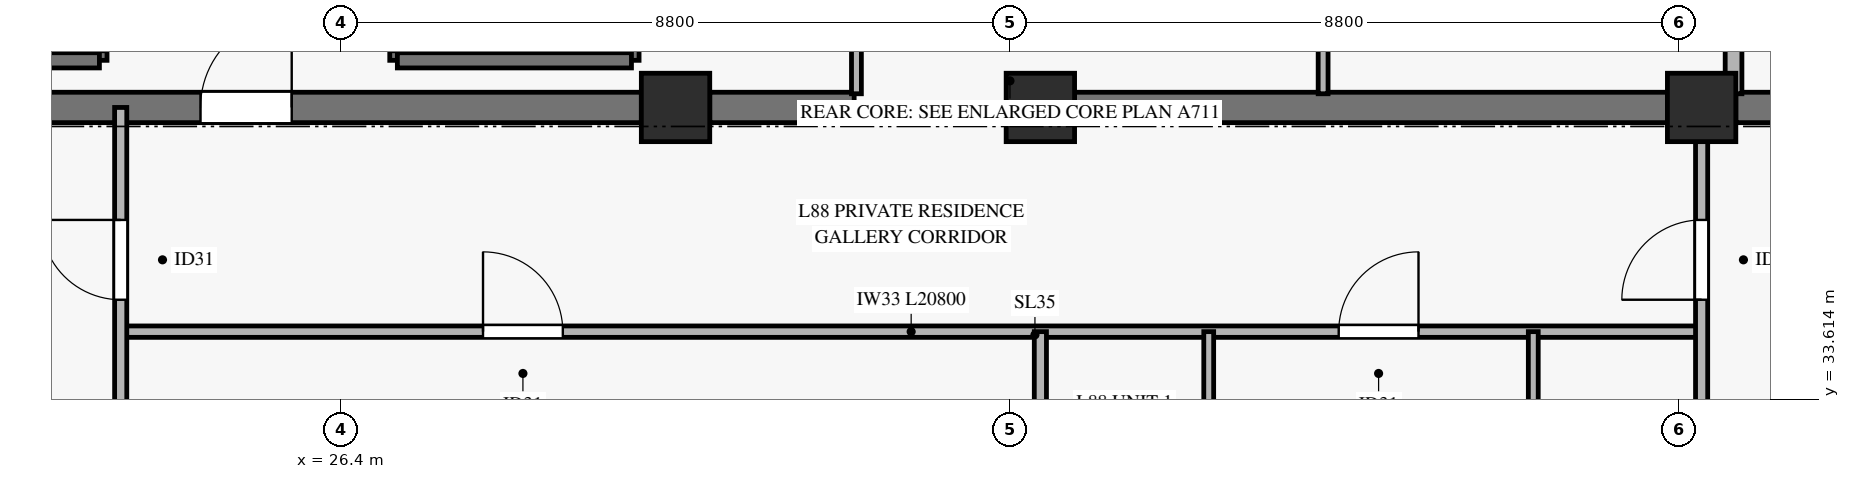
"""IFC4 building model, lengths in metres.
Left out: names, types, materials, properties, quantities, classifications, styles, units other than length and angle.
Written with IfcOpenShell. Run it as: python <this file> out.ifc"""

import sys

from ifc_helpers import new_model, si_unit, direction, frame, frame_2d, origin, origin_2d, place, context, subcontext, project, spatial, rectangle, extrude, source, transform, mapped, element, fill, save


model = new_model("IFC4")
c1 = context("Model", 3, precision=1e-05, world=origin(), true_north=direction((0.0, 1.0)))
c2 = subcontext(c1, "Body", "Model", "MODEL_VIEW")
j1 = project(units=[si_unit("LENGTHUNIT", "METRE"), si_unit("PLANEANGLEUNIT", "RADIAN")], contexts=[c1])
p1 = place(None, origin())
s1 = spatial("IfcSite", under=j1, at=p1, CompositionType="ELEMENT")
p2 = place(p1, origin())
s2 = spatial("IfcBuilding", under=s1, at=p2, CompositionType="ELEMENT")
p3 = place(p2, frame((0.0, 0.0, 339.1)))
s3 = spatial("IfcBuildingStorey", under=s2, at=p3, CompositionType="ELEMENT", Elevation=339.1)
m1 = source(origin(), c2, "Body", "SweptSolid", [
    extrude(rectangle(XDim=0.9, YDim=0.9, at=origin_2d()), origin(), (0.0, 0.0, 1.0), 3.185),
])
for number, where, z_axis, x_axis in (
    (1, (30.8, 37.45, 0.0), (0.0, 0.0, 1.0), (1.0, 0.0, 0.0)),
    (2, (35.6, 37.45, 0.0), (0.0, 0.0, 1.0), (1.0, 0.0, 0.0)),
    (3, (44.3, 37.45, 0.0), (0.0, 0.0, 1.0), (1.0, 0.0, 0.0)),
):
    element("IfcColumn", number, at=place(p3, frame(where, z_axis=z_axis, x_axis=x_axis)), inside=s3, PredefinedType="PILASTER", context=c2, shape_type="MappedRepresentation", body=[
        mapped(m1, transform((0.0, 0.0, 0.0), x_axis=(1.0, 0.0, 0.0), y_axis=(0.0, 1.0, 0.0), z_axis=(0.0, 0.0, 1.0), scale=1.0)),
    ])
p4 = place(p3, frame((20.3, 37.45, 0.0), z_axis=(0.0, 0.0, 1.0), x_axis=(1.0, 0.0, 0.0)))
e4 = element("IfcWall", 4, at=p4, inside=s3, PredefinedType="SHEAR", context=c2, shape_type="SweptSolid", body=[
    extrude(rectangle(XDim=10.05, YDim=0.4, at=frame_2d((5.025, 0.0))), origin(), (0.0, 0.0, 1.0), 3.185),
])
p5 = place(p4, frame((4.25, 0.0, 0.0)))
e5 = element("IfcOpeningElement", 5, at=p5, cuts=e4, PredefinedType="OPENING", context=c2, shape_type="SweptSolid", body=[
    extrude(rectangle(XDim=1.2, YDim=2.15, at=frame_2d((0.6, 1.075))), frame((0.0, 0.21, 0.0), z_axis=(0.0, -1.0, 0.0), x_axis=(1.0, 0.0, 0.0)), (0.0, 0.0, 1.0), 0.42),
])
p6 = place(p3, frame((31.25, 37.45, 0.0), z_axis=(0.0, 0.0, 1.0), x_axis=(1.0, 0.0, 0.0)))
e6 = element("IfcWall", 6, at=p6, inside=s3, PredefinedType="SHEAR", context=c2, shape_type="SweptSolid", body=[
    extrude(rectangle(XDim=1.9, YDim=0.4, at=frame_2d((0.95, 0.0))), origin(), (0.0, 0.0, 1.0), 3.185),
])
p7 = place(p3, frame((36.05, 37.45, 0.0), z_axis=(0.0, 0.0, 1.0), x_axis=(1.0, 0.0, 0.0)))
e7 = element("IfcWall", 7, at=p7, inside=s3, PredefinedType="SHEAR", context=c2, shape_type="SweptSolid", body=[
    extrude(rectangle(XDim=7.8, YDim=0.4, at=frame_2d((3.9, 0.0))), origin(), (0.0, 0.0, 1.0), 3.185),
])
p8 = place(p3, frame((44.75, 37.45, 0.0), z_axis=(0.0, 0.0, 1.0), x_axis=(1.0, 0.0, 0.0)))
e8 = element("IfcWall", 8, at=p8, inside=s3, PredefinedType="SHEAR", context=c2, shape_type="SweptSolid", body=[
    extrude(rectangle(XDim=5.35, YDim=0.4, at=frame_2d((2.675, 0.0))), origin(), (0.0, 0.0, 1.0), 3.185),
])
p9 = place(p8, frame((0.7, 0.0, 0.0)))
e9 = element("IfcOpeningElement", 9, at=p9, cuts=e8, PredefinedType="OPENING", context=c2, shape_type="SweptSolid", body=[
    extrude(rectangle(XDim=1.2, YDim=2.15, at=frame_2d((0.6, 1.075))), frame((0.0, 0.21, 0.0), z_axis=(0.0, -1.0, 0.0), x_axis=(1.0, 0.0, 0.0)), (0.0, 0.0, 1.0), 0.42),
])
p10 = place(p3, frame((23.22, 38.07, 0.0), z_axis=(0.0, 0.0, 1.0), x_axis=(0.0, 1.0, 0.0)))
e10 = element("IfcWall", 10, at=p10, inside=s3, PredefinedType="SOLIDWALL", context=c2, shape_type="SweptSolid", body=[
    extrude(rectangle(XDim=7.25, YDim=0.2, at=frame_2d((3.625, 0.0))), origin(), (0.0, 0.0, 1.0), 3.4),
])
p11 = place(p10, frame((0.11, 0.0, 0.0)))
e11 = element("IfcOpeningElement", 11, at=p11, cuts=e10, PredefinedType="OPENING", context=c2, shape_type="SweptSolid", body=[
    extrude(rectangle(XDim=1.1, YDim=2.15, at=frame_2d((0.55, 1.075))), frame((0.0, 0.11, 0.0), z_axis=(0.0, -1.0, 0.0), x_axis=(1.0, 0.0, 0.0)), (0.0, 0.0, 1.0), 0.22),
])
p12 = place(p3, frame((20.17, 38.07, 0.0), z_axis=(0.0, 0.0, 1.0), x_axis=(1.0, 0.0, 0.0)))
e12 = element("IfcWall", 12, at=p12, inside=s3, PredefinedType="SOLIDWALL", context=c2, shape_type="SweptSolid", body=[
    extrude(rectangle(XDim=3.05, YDim=0.2, at=frame_2d((1.525, 0.0))), origin(), (0.0, 0.0, 1.0), 3.4),
])
p13 = place(p3, frame((27.14, 38.07, 0.0), z_axis=(0.0, 0.0, 1.0), x_axis=(0.0, 1.0, 0.0)))
e13 = element("IfcWall", 13, at=p13, inside=s3, PredefinedType="SOLIDWALL", context=c2, shape_type="SweptSolid", body=[
    extrude(rectangle(XDim=7.25, YDim=0.2, at=frame_2d((3.625, 0.0))), origin(), (0.0, 0.0, 1.0), 3.4),
])
p14 = place(p13, frame((0.11, 0.0, 0.0)))
e14 = element("IfcOpeningElement", 14, at=p14, cuts=e13, PredefinedType="OPENING", context=c2, shape_type="SweptSolid", body=[
    extrude(rectangle(XDim=1.1, YDim=2.15, at=frame_2d((0.55, 1.075))), frame((0.0, 0.11, 0.0), z_axis=(0.0, -1.0, 0.0), x_axis=(1.0, 0.0, 0.0)), (0.0, 0.0, 1.0), 0.22),
])
p15 = place(p3, frame((30.22, 38.07, 0.0), z_axis=(0.0, 0.0, 1.0), x_axis=(0.0, 1.0, 0.0)))
e15 = element("IfcWall", 15, at=p15, inside=s3, PredefinedType="SOLIDWALL", context=c2, shape_type="SweptSolid", body=[
    extrude(rectangle(XDim=7.25, YDim=0.2, at=frame_2d((3.625, 0.0))), origin(), (0.0, 0.0, 1.0), 3.4),
])
p16 = place(p3, frame((27.14, 38.07, 0.0), z_axis=(0.0, 0.0, 1.0), x_axis=(1.0, 0.0, 0.0)))
e16 = element("IfcWall", 16, at=p16, inside=s3, PredefinedType="SOLIDWALL", context=c2, shape_type="SweptSolid", body=[
    extrude(rectangle(XDim=3.08, YDim=0.2, at=frame_2d((1.54, 0.0))), origin(), (0.0, 0.0, 1.0), 3.4),
])
p17 = place(p3, frame((44.72, 37.63, 0.0), z_axis=(0.0, 0.0, 1.0), x_axis=(0.0, 1.0, 0.0)))
e17 = element("IfcWall", 17, at=p17, inside=s3, PredefinedType="SOLIDWALL", context=c2, shape_type="SweptSolid", body=[
    extrude(rectangle(XDim=7.59, YDim=0.22, at=frame_2d((3.795, 0.0))), origin(), (0.0, 0.0, 1.0), 3.185),
])
p18 = place(p3, frame((33.18, 37.63, 0.0), z_axis=(0.0, 0.0, 1.0), x_axis=(0.0, 1.0, 0.0)))
e18 = element("IfcWall", 18, at=p18, inside=s3, PredefinedType="PARTITIONING", context=c2, shape_type="SweptSolid", body=[
    extrude(rectangle(XDim=6.52, YDim=0.13, at=frame_2d((3.26, 0.0))), origin(), (0.0, 0.0, 1.0), 2.27),
])
p19 = place(p18, frame((2.27, 0.0, 0.0)))
e19 = element("IfcOpeningElement", 19, at=p19, cuts=e18, PredefinedType="OPENING", context=c2, shape_type="SweptSolid", body=[
    extrude(rectangle(XDim=0.9, YDim=2.1, at=frame_2d((0.45, 1.05))), frame((0.0, 0.075, 0.0), z_axis=(0.0, -1.0, 0.0), x_axis=(1.0, 0.0, 0.0)), (0.0, 0.0, 1.0), 0.15),
])
p20 = place(p3, frame((39.32, 37.63, 0.0), z_axis=(0.0, 0.0, 1.0), x_axis=(0.0, 1.0, 0.0)))
e20 = element("IfcWall", 20, at=p20, inside=s3, PredefinedType="PARTITIONING", context=c2, shape_type="SweptSolid", body=[
    extrude(rectangle(XDim=8.74, YDim=0.13, at=frame_2d((4.37, 0.0))), origin(), (0.0, 0.0, 1.0), 3.185),
])
p21 = place(p20, frame((4.89, 0.0, 0.0)))
e21 = element("IfcOpeningElement", 21, at=p21, cuts=e20, PredefinedType="OPENING", context=c2, shape_type="SweptSolid", body=[
    extrude(rectangle(XDim=0.9, YDim=2.1, at=frame_2d((0.45, 1.05))), frame((0.0, 0.075, 0.0), z_axis=(0.0, -1.0, 0.0), x_axis=(1.0, 0.0, 0.0)), (0.0, 0.0, 1.0), 0.15),
])
p22 = place(p3, frame((23.5, 34.5, 0.0), z_axis=(0.0, 0.0, 1.0), x_axis=(1.0, 0.0, 0.0)))
e22 = element("IfcWall", 22, at=p22, inside=s3, PredefinedType="PARTITIONING", context=c2, shape_type="SweptSolid", body=[
    extrude(rectangle(XDim=20.8, YDim=0.15, at=frame_2d((10.4, 0.0))), origin(), (0.0, 0.0, 1.0), 2.47),
])
p23 = place(p22, frame((4.767, 0.0, 0.0)))
e23 = element("IfcOpeningElement", 23, at=p23, cuts=e22, PredefinedType="OPENING", context=c2, shape_type="SweptSolid", body=[
    extrude(rectangle(XDim=1.05, YDim=2.15, at=frame_2d((0.525, 1.075))), frame((0.0, 0.085, 0.0), z_axis=(0.0, -1.0, 0.0), x_axis=(1.0, 0.0, 0.0)), (0.0, 0.0, 1.0), 0.17),
])
p24 = place(p22, frame((16.025, 0.0, 0.0)))
e24 = element("IfcOpeningElement", 24, at=p24, cuts=e22, PredefinedType="OPENING", context=c2, shape_type="SweptSolid", body=[
    extrude(rectangle(XDim=1.05, YDim=2.15, at=frame_2d((0.525, 1.075))), frame((0.0, 0.085, 0.0), z_axis=(0.0, -1.0, 0.0), x_axis=(1.0, 0.0, 0.0)), (0.0, 0.0, 1.0), 0.17),
])
p25 = place(p3, frame((23.5, 22.568, 0.0), z_axis=(0.0, 0.0, 1.0), x_axis=(0.0, 1.0, 0.0)))
e25 = element("IfcWall", 25, at=p25, inside=s3, PredefinedType="PARTITIONING", context=c2, shape_type="SweptSolid", body=[
    extrude(rectangle(XDim=14.882, YDim=0.16, at=frame_2d((7.441, 0.0))), origin(), (0.0, 0.0, 1.0), 2.77),
])
p26 = place(p25, frame((12.352, 0.0, 0.0)))
e26 = element("IfcOpeningElement", 26, at=p26, cuts=e25, PredefinedType="OPENING", context=c2, shape_type="SweptSolid", body=[
    extrude(rectangle(XDim=1.05, YDim=2.15, at=frame_2d((0.525, 1.075))), frame((0.0, 0.09, 0.0), z_axis=(0.0, -1.0, 0.0), x_axis=(1.0, 0.0, 0.0)), (0.0, 0.0, 1.0), 0.18),
])
p27 = place(p3, frame((35.6, 22.568, 0.0), z_axis=(0.0, 0.0, 1.0), x_axis=(0.0, 1.0, 0.0)))
e27 = element("IfcWall", 27, at=p27, inside=s3, PredefinedType="PARTITIONING", context=c2, shape_type="SweptSolid", body=[
    extrude(rectangle(XDim=11.932, YDim=0.16, at=frame_2d((5.966, 0.0))), origin(), (0.0, 0.0, 1.0), 2.77),
])
p28 = place(p3, frame((44.3, 22.568, 0.0), z_axis=(0.0, 0.0, 1.0), x_axis=(0.0, 1.0, 0.0)))
e28 = element("IfcWall", 28, at=p28, inside=s3, PredefinedType="PARTITIONING", context=c2, shape_type="SweptSolid", body=[
    extrude(rectangle(XDim=14.882, YDim=0.16, at=frame_2d((7.441, 0.0))), origin(), (0.0, 0.0, 1.0), 2.47),
])
p29 = place(p28, frame((12.352, 0.0, 0.0)))
e29 = element("IfcOpeningElement", 29, at=p29, cuts=e28, PredefinedType="OPENING", context=c2, shape_type="SweptSolid", body=[
    extrude(rectangle(XDim=1.05, YDim=2.15, at=frame_2d((0.525, 1.075))), frame((0.0, 0.09, 0.0), z_axis=(0.0, -1.0, 0.0), x_axis=(1.0, 0.0, 0.0)), (0.0, 0.0, 1.0), 0.18),
])
p30 = place(p3, frame((37.815, 31.85, 0.0), z_axis=(0.0, 0.0, 1.0), x_axis=(0.0, 1.0, 0.0)))
e30 = element("IfcWall", 30, at=p30, inside=s3, PredefinedType="PARTITIONING", context=c2, shape_type="SweptSolid", body=[
    extrude(rectangle(XDim=2.65, YDim=0.13, at=frame_2d((1.325, 0.0))), origin(), (0.0, 0.0, 1.0), 2.77),
])
p31 = place(p3, frame((42.085, 31.85, 0.0), z_axis=(0.0, 0.0, 1.0), x_axis=(0.0, 1.0, 0.0)))
e31 = element("IfcWall", 31, at=p31, inside=s3, PredefinedType="PARTITIONING", context=c2, shape_type="SweptSolid", body=[
    extrude(rectangle(XDim=2.65, YDim=0.13, at=frame_2d((1.325, 0.0))), origin(), (0.0, 0.0, 1.0), 2.77),
])
p32 = place(p31, frame((0.67, 0.0, 0.0)))
e32 = element("IfcOpeningElement", 32, at=p32, cuts=e31, PredefinedType="OPENING", context=c2, shape_type="SweptSolid", body=[
    extrude(rectangle(XDim=0.9, YDim=2.1, at=frame_2d((0.45, 1.05))), frame((0.0, 0.075, 0.0), z_axis=(0.0, -1.0, 0.0), x_axis=(1.0, 0.0, 0.0)), (0.0, 0.0, 1.0), 0.15),
])
m2 = source(origin(), c2, "Body", "SweptSolid", [
    extrude(rectangle(XDim=1.2, YDim=2.15, at=frame_2d((0.6, 1.075))), frame((0.0, 0.025, 0.0), z_axis=(0.0, -1.0, 0.0), x_axis=(1.0, 0.0, 0.0)), (0.0, 0.0, 1.0), 0.05),
])
p33 = place(p5, origin())
e33 = element("IfcDoor", 33, at=p33, inside=s3, OperationType="SINGLE_SWING_RIGHT", PredefinedType="DOOR", context=c2, shape_type="MappedRepresentation", body=[
    mapped(m2, transform((0.0, 0.0, 0.0), x_axis=(1.0, 0.0, 0.0), y_axis=(0.0, 1.0, 0.0), z_axis=(0.0, 0.0, 1.0), scale=1.0)),
])
fill(e5, e33)
m3 = source(origin(), c2, "Body", "SweptSolid", [
    extrude(rectangle(XDim=1.05, YDim=2.15, at=frame_2d((0.525, 1.075))), frame((0.0, 0.025, 0.0), z_axis=(0.0, -1.0, 0.0), x_axis=(1.0, 0.0, 0.0)), (0.0, 0.0, 1.0), 0.05),
])
p34 = place(p26, origin())
e34 = element("IfcDoor", 34, at=p34, inside=s3, OperationType="SINGLE_SWING_RIGHT", PredefinedType="DOOR", context=c2, shape_type="MappedRepresentation", body=[
    mapped(m3, transform((0.0, 0.0, 0.0), x_axis=(1.0, 0.0, 0.0), y_axis=(0.0, 1.0, 0.0), z_axis=(0.0, 0.0, 1.0), scale=1.0)),
])
fill(e26, e34)
p35 = place(p23, origin())
e35 = element("IfcDoor", 35, at=p35, inside=s3, OperationType="SINGLE_SWING_LEFT", PredefinedType="DOOR", context=c2, shape_type="MappedRepresentation", body=[
    mapped(m3, transform((0.0, 0.0, 0.0), x_axis=(1.0, 0.0, 0.0), y_axis=(0.0, 1.0, 0.0), z_axis=(0.0, 0.0, 1.0), scale=1.0)),
])
fill(e23, e35)
p36 = place(p24, origin())
e36 = element("IfcDoor", 36, at=p36, inside=s3, OperationType="SINGLE_SWING_RIGHT", PredefinedType="DOOR", context=c2, shape_type="MappedRepresentation", body=[
    mapped(m3, transform((0.0, 0.0, 0.0), x_axis=(1.0, 0.0, 0.0), y_axis=(0.0, 1.0, 0.0), z_axis=(0.0, 0.0, 1.0), scale=1.0)),
])
fill(e24, e36)
p37 = place(p29, origin())
e37 = element("IfcDoor", 37, at=p37, inside=s3, OperationType="SINGLE_SWING_LEFT", PredefinedType="DOOR", context=c2, shape_type="MappedRepresentation", body=[
    mapped(m3, transform((0.0, 0.0, 0.0), x_axis=(1.0, 0.0, 0.0), y_axis=(0.0, 1.0, 0.0), z_axis=(0.0, 0.0, 1.0), scale=1.0)),
])
fill(e29, e37)
save(model, sys.argv[1])
